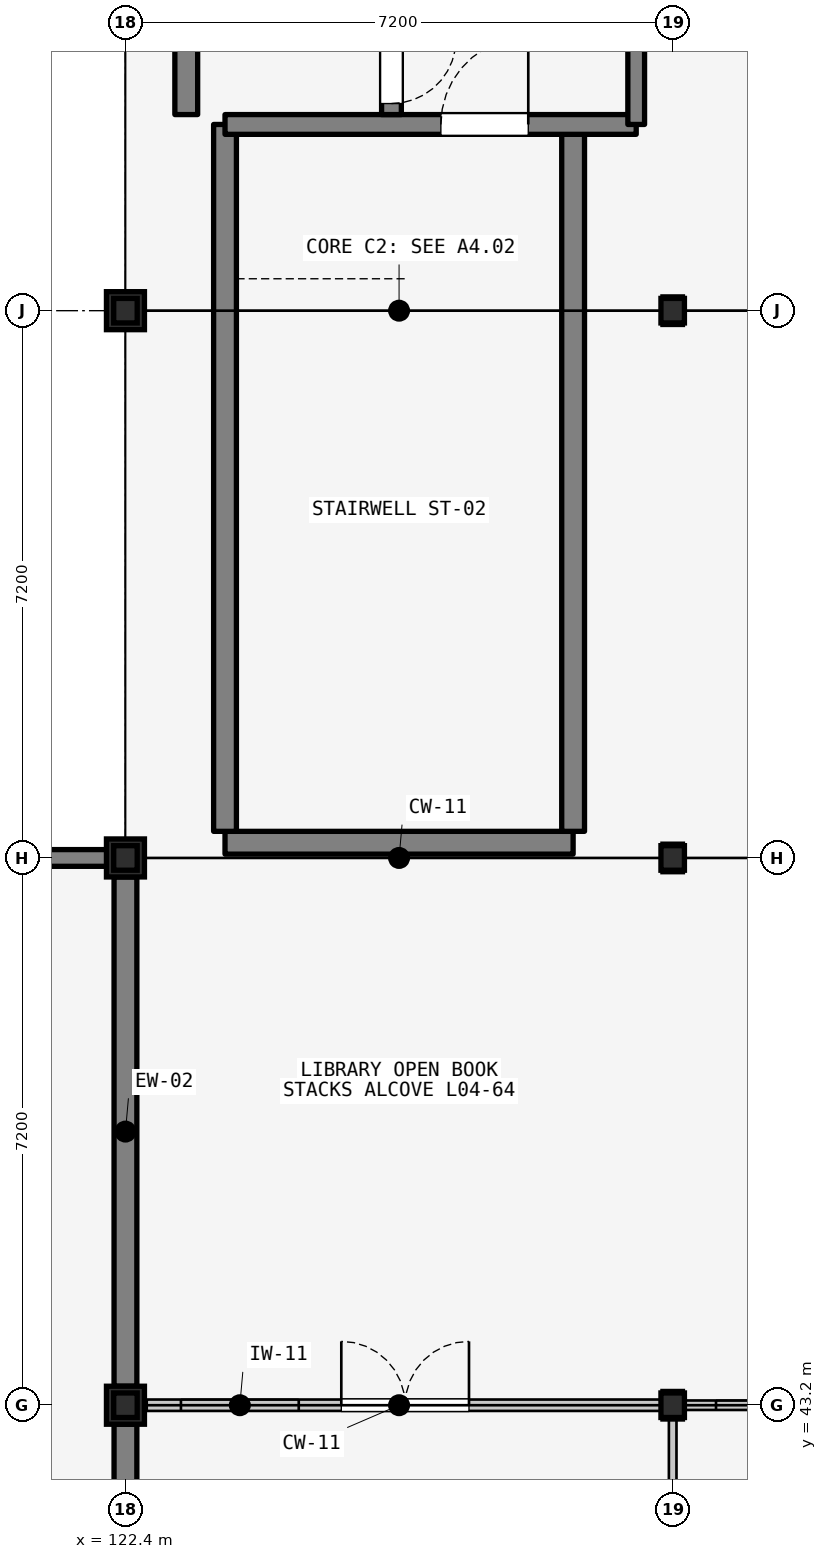
"""IFC4 building model, lengths in metres.
Left out: names, types, materials, properties, quantities, classifications, styles, units other than length and angle.
Written with IfcOpenShell. Run it as: python <this file> out.ifc"""

import sys

from ifc_helpers import new_model, si_unit, direction, frame, frame_2d, origin, origin_2d, place, context, subcontext, project, spatial, rectangle, i_section, extrude, element, fill, save


model = new_model("IFC4")
c1 = context("Model", 3, precision=1e-05, world=origin(), true_north=direction((0.0, 1.0)))
c2 = subcontext(c1, "Body", "Model", "MODEL_VIEW")
j1 = project(units=[si_unit("LENGTHUNIT", "METRE"), si_unit("PLANEANGLEUNIT", "RADIAN")], contexts=[c1])
p1 = place(None, origin())
s1 = spatial("IfcSite", under=j1, at=p1, CompositionType="ELEMENT")
p2 = place(p1, origin())
s2 = spatial("IfcBuilding", under=s1, at=p2, CompositionType="ELEMENT")
p3 = place(p2, frame((0.0, 0.0, 14.1)))
s3 = spatial("IfcBuildingStorey", under=s2, at=p3, CompositionType="ELEMENT", Elevation=14.1)
for number, where, z_axis, x_axis in (
    (1, (122.4, 43.2, 0.0), (0.0, 0.0, 1.0), (1.0, 0.0, 0.0)),
    (2, (122.4, 50.4, 0.0), (0.0, 0.0, 1.0), (1.0, 0.0, 0.0)),
    (3, (122.4, 57.6, 0.0), (0.0, 0.0, 1.0), (1.0, 0.0, 0.0)),
):
    element("IfcColumn", number, at=place(p3, frame(where, z_axis=z_axis, x_axis=x_axis)), inside=s3, PredefinedType="COLUMN", context=c2, shape_type="SweptSolid", body=[
        extrude(rectangle(XDim=0.5, YDim=0.5, at=origin_2d()), origin(), (0.0, 0.0, 1.0), 3.9),
    ])
for number, where, z_axis, x_axis in (
    (4, (129.6, 43.2, 0.0), (0.0, 0.0, 1.0), (1.0, 0.0, 0.0)),
    (5, (129.6, 50.4, 0.0), (0.0, 0.0, 1.0), (1.0, 0.0, 0.0)),
    (6, (129.6, 57.6, 0.0), (0.0, 0.0, 1.0), (1.0, 0.0, 0.0)),
):
    element("IfcColumn", number, at=place(p3, frame(where, z_axis=z_axis, x_axis=x_axis)), inside=s3, PredefinedType="COLUMN", context=c2, shape_type="SweptSolid", body=[
        extrude(i_section(OverallWidth=0.257, OverallDepth=0.363, WebThickness=0.013, FlangeThickness=0.022, FilletRadius=0.015, at=origin_2d()), origin(), (0.0, 0.0, 1.0), 3.9),
    ])
for number, where, z_axis, x_axis in (
    (7, (122.4, 43.2, 3.9), (0.0, 0.0, 1.0), (1.0, 0.0, 0.0)),
    (8, (129.6, 43.2, 3.9), (0.0, 0.0, 1.0), (1.0, 0.0, 0.0)),
    (9, (122.4, 50.4, 3.9), (0.0, 0.0, 1.0), (1.0, 0.0, 0.0)),
    (10, (129.6, 50.4, 3.9), (0.0, 0.0, 1.0), (1.0, 0.0, 0.0)),
    (11, (122.4, 57.6, 3.9), (0.0, 0.0, 1.0), (1.0, 0.0, 0.0)),
    (12, (129.6, 57.6, 3.9), (0.0, 0.0, 1.0), (1.0, 0.0, 0.0)),
):
    element("IfcColumn", number, at=place(p3, frame(where, z_axis=z_axis, x_axis=x_axis)), inside=s3, PredefinedType="COLUMN", context=c2, shape_type="SweptSolid", body=[
        extrude(i_section(OverallWidth=0.309, OverallDepth=0.323, WebThickness=0.014, FlangeThickness=0.023, FilletRadius=0.015, at=origin_2d()), origin(), (0.0, 0.0, 1.0), 2.22),
    ])
p4 = place(p3, frame((122.4, 36.25, 0.0), z_axis=(0.0, 0.0, 1.0), x_axis=(0.0, 1.0, 0.0)))
e13 = element("IfcWall", 13, at=p4, inside=s3, PredefinedType="SOLIDWALL", context=c2, shape_type="SweptSolid", body=[
    extrude(rectangle(XDim=6.7, YDim=0.3, at=frame_2d((3.35, 0.0))), origin(), (0.0, 0.0, 1.0), 3.2),
])
p5 = place(p4, frame((1.008, 0.0, 0.95)))
e14 = element("IfcOpeningElement", 14, at=p5, cuts=e13, PredefinedType="OPENING", context=c2, shape_type="SweptSolid", body=[
    extrude(rectangle(XDim=1.2, YDim=1.7, at=frame_2d((0.6, 0.85))), frame((0.0, 0.16, 0.0), z_axis=(0.0, -1.0, 0.0), x_axis=(1.0, 0.0, 0.0)), (0.0, 0.0, 1.0), 0.32),
])
p6 = place(p4, frame((4.492, 0.0, 0.95)))
e15 = element("IfcOpeningElement", 15, at=p6, cuts=e13, PredefinedType="OPENING", context=c2, shape_type="SweptSolid", body=[
    extrude(rectangle(XDim=1.2, YDim=1.7, at=frame_2d((0.6, 0.85))), frame((0.0, 0.16, 0.0), z_axis=(0.0, -1.0, 0.0), x_axis=(1.0, 0.0, 0.0)), (0.0, 0.0, 1.0), 0.32),
])
p7 = place(p3, frame((122.4, 43.45, 0.0), z_axis=(0.0, 0.0, 1.0), x_axis=(0.0, 1.0, 0.0)))
e16 = element("IfcWall", 16, at=p7, inside=s3, PredefinedType="SOLIDWALL", context=c2, shape_type="SweptSolid", body=[
    extrude(rectangle(XDim=6.7, YDim=0.3, at=frame_2d((3.35, 0.0))), origin(), (0.0, 0.0, 1.0), 3.2),
])
p8 = place(p3, frame((115.35, 50.4, 0.0), z_axis=(0.0, 0.0, 1.0), x_axis=(1.0, 0.0, 0.0)))
e17 = element("IfcWall", 17, at=p8, inside=s3, PredefinedType="PARAPET", context=c2, shape_type="SweptSolid", body=[
    extrude(rectangle(XDim=6.9, YDim=0.22, at=frame_2d((3.45, 0.0))), origin(), (0.0, 0.0, 1.0), 0.85),
])
p9 = place(p3, frame((123.71, 50.6, 0.0), z_axis=(0.0, 0.0, 1.0), x_axis=(1.0, 0.0, 0.0)))
e18 = element("IfcWall", 18, at=p9, inside=s3, PredefinedType="SHEAR", context=c2, shape_type="SweptSolid", body=[
    extrude(rectangle(XDim=4.58, YDim=0.3, at=frame_2d((2.29, 0.0))), origin(), (0.0, 0.0, 1.0), 3.72),
])
for number, where, z_axis, x_axis in (
    (19, (123.71, 50.75, 0.0), (0.0, 0.0, 1.0), (0.0, 1.0, 0.0)),
    (20, (128.29, 50.75, 0.0), (0.0, 0.0, 1.0), (0.0, 1.0, 0.0)),
):
    element("IfcWall", number, at=place(p3, frame(where, z_axis=z_axis, x_axis=x_axis)), inside=s3, PredefinedType="SHEAR", context=c2, shape_type="SweptSolid", body=[
        extrude(rectangle(XDim=9.3, YDim=0.3, at=frame_2d((4.65, 0.0))), origin(), (0.0, 0.0, 1.0), 3.72),
    ])
p10 = place(p3, frame((123.71, 60.05, 0.0), z_axis=(0.0, 0.0, 1.0), x_axis=(1.0, 0.0, 0.0)))
e21 = element("IfcWall", 21, at=p10, inside=s3, PredefinedType="SHEAR", context=c2, shape_type="SweptSolid", body=[
    extrude(rectangle(XDim=5.41, YDim=0.26, at=frame_2d((2.705, 0.0))), origin(), (0.0, 0.0, 1.0), 3.72),
])
p11 = place(p10, frame((2.84, 0.0, 0.0)))
e22 = element("IfcOpeningElement", 22, at=p11, cuts=e21, PredefinedType="OPENING", context=c2, shape_type="SweptSolid", body=[
    extrude(rectangle(XDim=1.15, YDim=2.15, at=frame_2d((0.575, 1.075))), frame((0.0, 0.14, 0.0), z_axis=(0.0, -1.0, 0.0), x_axis=(1.0, 0.0, 0.0)), (0.0, 0.0, 1.0), 0.28),
])
p12 = place(p3, frame((123.2, 60.18, 0.0), z_axis=(0.0, 0.0, 1.0), x_axis=(0.0, 1.0, 0.0)))
e23 = element("IfcWall", 23, at=p12, inside=s3, PredefinedType="SHEAR", context=c2, shape_type="SweptSolid", body=[
    extrude(rectangle(XDim=4.32, YDim=0.3, at=frame_2d((2.16, 0.0))), origin(), (0.0, 0.0, 1.0), 3.72),
])
p13 = place(p3, frame((125.9, 64.5, 0.0), z_axis=(0.0, 0.0, 1.0), x_axis=(0.0, -1.0, 0.0)))
e24 = element("IfcWall", 24, at=p13, inside=s3, PredefinedType="SHEAR", context=c2, shape_type="SweptSolid", body=[
    extrude(rectangle(XDim=4.32, YDim=0.26, at=frame_2d((2.16, 0.0))), origin(), (0.0, 0.0, 1.0), 3.72),
])
p14 = place(p13, frame((0.925, 0.0, 0.0)))
e25 = element("IfcOpeningElement", 25, at=p14, cuts=e24, PredefinedType="OPENING", context=c2, shape_type="SweptSolid", body=[
    extrude(rectangle(XDim=1.35, YDim=2.2, at=frame_2d((0.675, 1.1))), frame((0.0, 0.14, 0.0), z_axis=(0.0, -1.0, 0.0), x_axis=(1.0, 0.0, 0.0)), (0.0, 0.0, 1.0), 0.28),
])
p15 = place(p13, frame((3.325, 0.0, 0.0)))
e26 = element("IfcOpeningElement", 26, at=p15, cuts=e24, PredefinedType="OPENING", context=c2, shape_type="SweptSolid", body=[
    extrude(rectangle(XDim=0.85, YDim=2.05, at=frame_2d((0.425, 1.025))), frame((0.0, 0.14, 0.0), z_axis=(0.0, -1.0, 0.0), x_axis=(1.0, 0.0, 0.0)), (0.0, 0.0, 1.0), 0.28),
])
p16 = place(p3, frame((129.12, 64.5, 0.0), z_axis=(0.0, 0.0, 1.0), x_axis=(0.0, -1.0, 0.0)))
e27 = element("IfcWall", 27, at=p16, inside=s3, PredefinedType="SHEAR", context=c2, shape_type="SweptSolid", body=[
    extrude(rectangle(XDim=4.45, YDim=0.22, at=frame_2d((2.225, 0.0))), origin(), (0.0, 0.0, 1.0), 3.72),
])
p17 = place(p16, frame((1.625, 0.0, 0.0)))
e28 = element("IfcOpeningElement", 28, at=p17, cuts=e27, PredefinedType="OPENING", context=c2, shape_type="SweptSolid", body=[
    extrude(rectangle(XDim=1.45, YDim=2.2, at=frame_2d((0.725, 1.1))), frame((0.0, 0.12, 0.0), z_axis=(0.0, -1.0, 0.0), x_axis=(1.0, 0.0, 0.0)), (0.0, 0.0, 1.0), 0.24),
])
p18 = place(p3, frame((122.68, 43.2, 0.0), z_axis=(0.0, 0.0, 1.0), x_axis=(1.0, 0.0, 0.0)))
e29 = element("IfcWall", 29, at=p18, inside=s3, PredefinedType="PARTITIONING", context=c2, shape_type="SweptSolid", body=[
    extrude(rectangle(XDim=6.8, YDim=0.15, at=frame_2d((3.4, 0.0))), origin(), (0.0, 0.0, 1.0), 3.19),
])
p19 = place(p18, frame((2.56, 0.0, 0.0)))
e30 = element("IfcOpeningElement", 30, at=p19, cuts=e29, PredefinedType="OPENING", context=c2, shape_type="SweptSolid", body=[
    extrude(rectangle(XDim=1.68, YDim=2.35, at=frame_2d((0.84, 1.175))), frame((0.0, 0.085, 0.0), z_axis=(0.0, -1.0, 0.0), x_axis=(1.0, 0.0, 0.0)), (0.0, 0.0, 1.0), 0.17),
])
p20 = place(p18, frame((0.45, 0.0, 1.05)))
e31 = element("IfcOpeningElement", 31, at=p20, cuts=e29, PredefinedType="OPENING", context=c2, shape_type="SweptSolid", body=[
    extrude(rectangle(XDim=1.55, YDim=1.15, at=frame_2d((0.775, 0.575))), frame((0.0, 0.085, 0.0), z_axis=(0.0, -1.0, 0.0), x_axis=(1.0, 0.0, 0.0)), (0.0, 0.0, 1.0), 0.17),
])
p21 = place(p3, frame((129.6, 43.08, 0.0), z_axis=(0.0, 0.0, 1.0), x_axis=(0.0, -1.0, 0.0)))
e32 = element("IfcWall", 32, at=p21, inside=s3, PredefinedType="PARTITIONING", context=c2, shape_type="SweptSolid", body=[
    extrude(rectangle(XDim=6.96, YDim=0.1, at=frame_2d((3.48, 0.0))), origin(), (0.0, 0.0, 1.0), 3.19),
])
p22 = place(p3, frame((129.72, 43.2, 0.0), z_axis=(0.0, 0.0, 1.0), x_axis=(1.0, 0.0, 0.0)))
e33 = element("IfcWall", 33, at=p22, inside=s3, PredefinedType="PARTITIONING", context=c2, shape_type="SweptSolid", body=[
    extrude(rectangle(XDim=6.8, YDim=0.125, at=frame_2d((3.4, 0.0))), origin(), (0.0, 0.0, 1.0), 3.19),
])
p23 = place(p22, frame((2.56, 0.0, 0.0)))
e34 = element("IfcOpeningElement", 34, at=p23, cuts=e33, PredefinedType="OPENING", context=c2, shape_type="SweptSolid", body=[
    extrude(rectangle(XDim=1.68, YDim=2.35, at=frame_2d((0.84, 1.175))), frame((0.0, 0.073, 0.0), z_axis=(0.0, -1.0, 0.0), x_axis=(1.0, 0.0, 0.0)), (0.0, 0.0, 1.0), 0.145),
])
p24 = place(p22, frame((0.45, 0.0, 1.05)))
e35 = element("IfcOpeningElement", 35, at=p24, cuts=e33, PredefinedType="OPENING", context=c2, shape_type="SweptSolid", body=[
    extrude(rectangle(XDim=1.7, YDim=1.18, at=frame_2d((0.85, 0.59))), frame((0.0, 0.073, 0.0), z_axis=(0.0, -1.0, 0.0), x_axis=(1.0, 0.0, 0.0)), (0.0, 0.0, 1.0), 0.145),
])
p25 = place(p11, origin())
e36 = element("IfcDoor", 36, at=p25, inside=s3, OperationType="SINGLE_SWING_RIGHT", PredefinedType="DOOR", context=c2, shape_type="SweptSolid", body=[
    extrude(rectangle(XDim=1.15, YDim=2.15, at=frame_2d((0.575, 1.075))), frame((0.0, 0.025, 0.0), z_axis=(0.0, -1.0, 0.0), x_axis=(1.0, 0.0, 0.0)), (0.0, 0.0, 1.0), 0.05),
])
fill(e22, e36)
p26 = place(p15, origin())
e37 = element("IfcDoor", 37, at=p26, inside=s3, OperationType="SINGLE_SWING_LEFT", PredefinedType="DOOR", context=c2, shape_type="SweptSolid", body=[
    extrude(rectangle(XDim=0.85, YDim=2.05, at=frame_2d((0.425, 1.025))), frame((0.0, 0.025, 0.0), z_axis=(0.0, -1.0, 0.0), x_axis=(1.0, 0.0, 0.0)), (0.0, 0.0, 1.0), 0.05),
])
fill(e26, e37)
p27 = place(p19, origin())
e38 = element("IfcDoor", 38, at=p27, inside=s3, OperationType="DOUBLE_DOOR_SINGLE_SWING", PredefinedType="DOOR", context=c2, shape_type="SweptSolid", body=[
    extrude(rectangle(XDim=1.68, YDim=2.35, at=frame_2d((0.84, 1.175))), frame((0.0, 0.025, 0.0), z_axis=(0.0, -1.0, 0.0), x_axis=(1.0, 0.0, 0.0)), (0.0, 0.0, 1.0), 0.05),
])
fill(e30, e38)
p28 = place(p20, origin())
e39 = element("IfcWindow", 39, at=p28, inside=s3, PartitioningType="SINGLE_PANEL", PredefinedType="WINDOW", context=c2, shape_type="SweptSolid", body=[
    extrude(rectangle(XDim=1.55, YDim=1.15, at=frame_2d((0.775, 0.575))), frame((0.0, 0.03, 0.0), z_axis=(0.0, -1.0, 0.0), x_axis=(1.0, 0.0, 0.0)), (0.0, 0.0, 1.0), 0.06),
])
fill(e31, e39)
p29 = place(p24, origin())
e40 = element("IfcWindow", 40, at=p29, inside=s3, PartitioningType="SINGLE_PANEL", PredefinedType="WINDOW", context=c2, shape_type="SweptSolid", body=[
    extrude(rectangle(XDim=1.7, YDim=1.18, at=frame_2d((0.85, 0.59))), frame((0.0, 0.03, 0.0), z_axis=(0.0, -1.0, 0.0), x_axis=(1.0, 0.0, 0.0)), (0.0, 0.0, 1.0), 0.06),
])
fill(e35, e40)
save(model, sys.argv[1])
